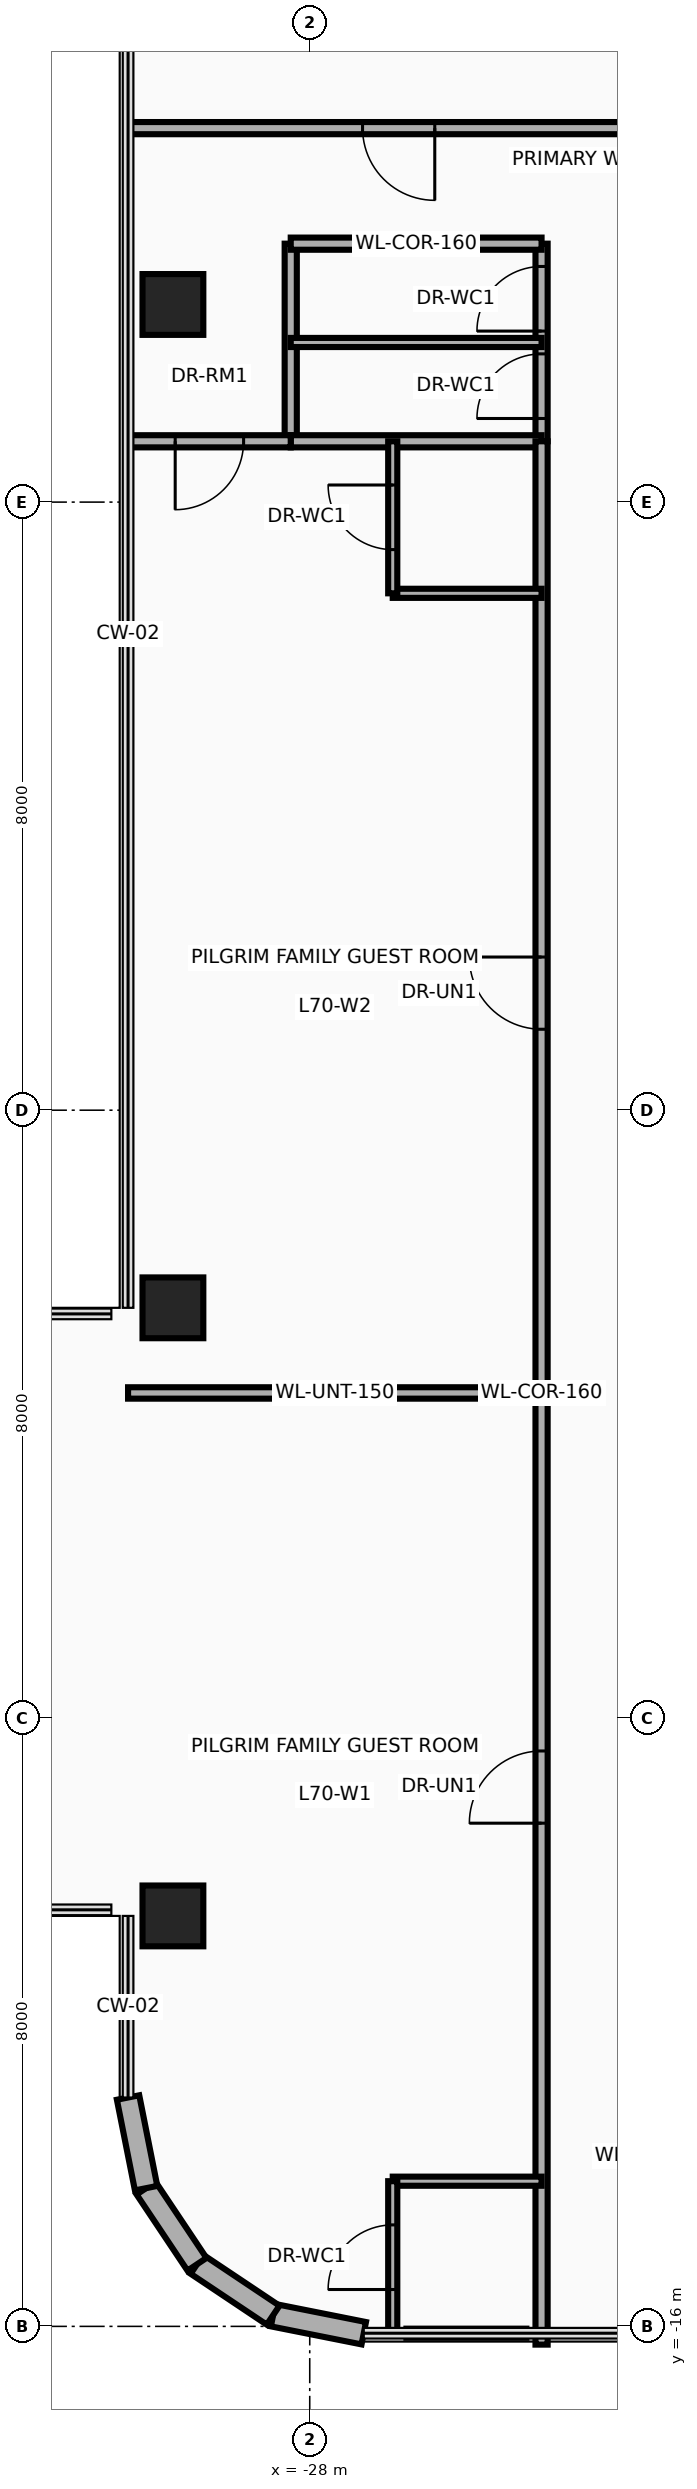
"""IFC4 building model, lengths in metres.
Left out: names, types, materials, properties, quantities, classifications, styles, units other than length and angle.
Written with IfcOpenShell. Run it as: python <this file> out.ifc"""

import sys

from ifc_helpers import new_model, si_unit, direction, frame, frame_2d, origin, origin_2d, place, context, subcontext, project, spatial, rectangle, extrude, source, transform, mapped, element, fill, save


model = new_model("IFC4")
c1 = context("Model", 3, precision=1e-05, world=origin(), true_north=direction((0.0, 1.0)))
c2 = subcontext(c1, "Body", "Model", "MODEL_VIEW")
j1 = project(units=[si_unit("LENGTHUNIT", "METRE"), si_unit("PLANEANGLEUNIT", "RADIAN")], contexts=[c1])
p1 = place(None, origin())
s1 = spatial("IfcSite", under=j1, at=p1, CompositionType="ELEMENT")
p2 = place(p1, origin())
s2 = spatial("IfcBuilding", under=s1, at=p2, CompositionType="ELEMENT")
p3 = place(p2, frame((0.0, 0.0, 269.5)))
s3 = spatial("IfcBuildingStorey", under=s2, at=p3, CompositionType="ELEMENT", Elevation=269.5)
m1 = source(origin(), c2, "Body", "SweptSolid", [
    extrude(rectangle(XDim=0.8, YDim=0.8, at=origin_2d()), origin(), (0.0, 0.0, 1.0), 3.5),
])
for number, where, z_axis, x_axis in (
    (1, (-29.8, -10.6, 0.0), (0.0, 0.0, 1.0), (1.0, 0.0, 0.0)),
    (2, (-29.8, -2.6, 0.0), (0.0, 0.0, 1.0), (1.0, 0.0, 0.0)),
    (3, (-29.8, 10.6, 0.0), (0.0, 0.0, 1.0), (1.0, 0.0, 0.0)),
):
    element("IfcColumn", number, at=place(p3, frame(where, z_axis=z_axis, x_axis=x_axis)), inside=s3, PredefinedType="COLUMN", context=c2, shape_type="MappedRepresentation", body=[
        mapped(m1, transform((0.0, 0.0, 0.0), x_axis=(1.0, 0.0, 0.0), y_axis=(0.0, 1.0, 0.0), z_axis=(0.0, 0.0, 1.0), scale=1.0)),
    ])
p4 = place(p3, frame((-27.289, -16.09, 0.0), z_axis=(0.0, 0.0, 1.0), x_axis=(-0.980765602568, 0.195189223115, 0.0)))
e4 = element("IfcWall", 4, at=p4, inside=s3, PredefinedType="SOLIDWALL", context=c2, shape_type="SweptSolid", body=[
    extrude(rectangle(XDim=1.216, YDim=0.3, at=frame_2d((0.608, 0.0))), origin(), (0.0, 0.0, 1.0), 3.26),
])
for number, where, z_axis, x_axis in (
    (5, (-28.482, -15.853, 0.0), (0.0, 0.0, 1.0), (-0.831, 0.556, 0.0)),
    (6, (-29.483, -15.183, 0.0), (0.0, 0.0, 1.0), (-0.556, 0.831, 0.0)),
):
    element("IfcWall", number, at=place(p3, frame(where, z_axis=z_axis, x_axis=x_axis)), inside=s3, PredefinedType="SOLIDWALL", context=c2, shape_type="SweptSolid", body=[
        extrude(rectangle(XDim=1.205, YDim=0.3, at=frame_2d((0.603, 0.0))), origin(), (0.0, 0.0, 1.0), 3.26),
    ])
p5 = place(p3, frame((-30.153, -14.182, 0.0), z_axis=(0.0, 0.0, 1.0), x_axis=(-0.194996050505, 0.980804027463, 0.0)))
e7 = element("IfcWall", 7, at=p5, inside=s3, PredefinedType="SOLIDWALL", context=c2, shape_type="SweptSolid", body=[
    extrude(rectangle(XDim=1.216, YDim=0.3, at=frame_2d((0.608, 0.0))), origin(), (0.0, 0.0, 1.0), 3.26),
])
p6 = place(p3, frame((-28.25, 8.8, 0.0), z_axis=(0.0, 0.0, 1.0), x_axis=(0.0, 1.0, 0.0)))
e8 = element("IfcWall", 8, at=p6, inside=s3, PredefinedType="PARTITIONING", context=c2, shape_type="SweptSolid", body=[
    extrude(rectangle(XDim=2.6, YDim=0.16, at=frame_2d((1.3, 0.0))), origin(), (0.0, 0.0, 1.0), 2.623),
])
p7 = place(p3, frame((-24.95, 8.8, 0.0), z_axis=(0.0, 0.0, 1.0), x_axis=(0.0, 1.0, 0.0)))
e9 = element("IfcWall", 9, at=p7, inside=s3, PredefinedType="PARTITIONING", context=c2, shape_type="SweptSolid", body=[
    extrude(rectangle(XDim=2.6, YDim=0.16, at=frame_2d((1.3, 0.0))), origin(), (0.0, 0.0, 1.0), 2.623),
])
p8 = place(p7, frame((0.3, 0.0, 0.0)))
e10 = element("IfcOpeningElement", 10, at=p8, cuts=e9, PredefinedType="OPENING", context=c2, shape_type="SweptSolid", body=[
    extrude(rectangle(XDim=0.85, YDim=2.1, at=frame_2d((0.425, 1.05))), frame((0.0, 0.095, 0.0), z_axis=(0.0, -1.0, 0.0), x_axis=(1.0, 0.0, 0.0)), (0.0, 0.0, 1.0), 0.19),
])
p9 = place(p7, frame((1.45, 0.0, 0.0)))
e11 = element("IfcOpeningElement", 11, at=p9, cuts=e9, PredefinedType="OPENING", context=c2, shape_type="SweptSolid", body=[
    extrude(rectangle(XDim=0.85, YDim=2.1, at=frame_2d((0.425, 1.05))), frame((0.0, 0.095, 0.0), z_axis=(0.0, -1.0, 0.0), x_axis=(1.0, 0.0, 0.0)), (0.0, 0.0, 1.0), 0.19),
])
for number, where, z_axis, x_axis in (
    (12, (-28.25, 8.8, 0.0), (0.0, 0.0, 1.0), (1.0, 0.0, 0.0)),
    (13, (-28.25, 11.4, 0.0), (0.0, 0.0, 1.0), (1.0, 0.0, 0.0)),
):
    element("IfcWall", number, at=place(p3, frame(where, z_axis=z_axis, x_axis=x_axis)), inside=s3, PredefinedType="PARTITIONING", context=c2, shape_type="SweptSolid", body=[
        extrude(rectangle(XDim=3.3, YDim=0.16, at=frame_2d((1.65, 0.0))), origin(), (0.0, 0.0, 1.0), 3.26),
    ])
p10 = place(p3, frame((-28.25, 10.1, 0.0), z_axis=(0.0, 0.0, 1.0), x_axis=(1.0, 0.0, 0.0)))
e14 = element("IfcWall", 14, at=p10, inside=s3, PredefinedType="PARTITIONING", context=c2, shape_type="SweptSolid", body=[
    extrude(rectangle(XDim=3.3, YDim=0.12, at=frame_2d((1.65, 0.0))), origin(), (0.0, 0.0, 1.0), 3.26),
])
p11 = place(p3, frame((-24.95, -16.24, 0.0), z_axis=(0.0, 0.0, 1.0), x_axis=(0.0, 1.0, 0.0)))
e15 = element("IfcWall", 15, at=p11, inside=s3, PredefinedType="PARTITIONING", context=c2, shape_type="SweptSolid", body=[
    extrude(rectangle(XDim=25.04, YDim=0.16, at=frame_2d((12.52, 0.0))), origin(), (0.0, 0.0, 1.0), 2.623),
])
p12 = place(p11, frame((6.86, 0.0, 0.0)))
e16 = element("IfcOpeningElement", 16, at=p12, cuts=e15, PredefinedType="OPENING", context=c2, shape_type="SweptSolid", body=[
    extrude(rectangle(XDim=0.95, YDim=2.15, at=frame_2d((0.475, 1.075))), frame((0.0, 0.095, 0.0), z_axis=(0.0, -1.0, 0.0), x_axis=(1.0, 0.0, 0.0)), (0.0, 0.0, 1.0), 0.19),
])
p13 = place(p11, frame((17.305, 0.0, 0.0)))
e17 = element("IfcOpeningElement", 17, at=p13, cuts=e15, PredefinedType="OPENING", context=c2, shape_type="SweptSolid", body=[
    extrude(rectangle(XDim=0.95, YDim=2.15, at=frame_2d((0.475, 1.075))), frame((0.0, 0.095, 0.0), z_axis=(0.0, -1.0, 0.0), x_axis=(1.0, 0.0, 0.0)), (0.0, 0.0, 1.0), 0.19),
])
p14 = place(p3, frame((-30.39, 8.8, 0.0), z_axis=(0.0, 0.0, 1.0), x_axis=(1.0, 0.0, 0.0)))
e18 = element("IfcWall", 18, at=p14, inside=s3, PredefinedType="PARTITIONING", context=c2, shape_type="SweptSolid", body=[
    extrude(rectangle(XDim=2.14, YDim=0.16, at=frame_2d((1.07, 0.0))), origin(), (0.0, 0.0, 1.0), 2.706),
])
p15 = place(p14, frame((0.62, 0.0, 0.0)))
e19 = element("IfcOpeningElement", 19, at=p15, cuts=e18, PredefinedType="OPENING", context=c2, shape_type="SweptSolid", body=[
    extrude(rectangle(XDim=0.9, YDim=2.1, at=frame_2d((0.45, 1.05))), frame((0.0, 0.095, 0.0), z_axis=(0.0, -1.0, 0.0), x_axis=(1.0, 0.0, 0.0)), (0.0, 0.0, 1.0), 0.19),
])
p16 = place(p3, frame((-30.39, -3.72, 0.0), z_axis=(0.0, 0.0, 1.0), x_axis=(1.0, 0.0, 0.0)))
e20 = element("IfcWall", 20, at=p16, inside=s3, PredefinedType="PARTITIONING", context=c2, shape_type="SweptSolid", body=[
    extrude(rectangle(XDim=5.44, YDim=0.15, at=frame_2d((2.72, 0.0))), origin(), (0.0, 0.0, 1.0), 2.706),
])
p17 = place(p3, frame((-26.908, -14.09, 0.0), z_axis=(0.0, 0.0, 1.0), x_axis=(1.0, 0.0, 0.0)))
e21 = element("IfcWall", 21, at=p17, inside=s3, PredefinedType="PARTITIONING", context=c2, shape_type="SweptSolid", body=[
    extrude(rectangle(XDim=1.958, YDim=0.12, at=frame_2d((0.979, 0.0))), origin(), (0.0, 0.0, 1.0), 3.26),
])
p18 = place(p3, frame((-26.908, -16.09, 0.0), z_axis=(0.0, 0.0, 1.0), x_axis=(0.0, 1.0, 0.0)))
e22 = element("IfcWall", 22, at=p18, inside=s3, PredefinedType="PARTITIONING", context=c2, shape_type="SweptSolid", body=[
    extrude(rectangle(XDim=2.0, YDim=0.12, at=frame_2d((1.0, 0.0))), origin(), (0.0, 0.0, 1.0), 3.26),
])
p19 = place(p18, frame((0.575, 0.0, 0.0)))
e23 = element("IfcOpeningElement", 23, at=p19, cuts=e22, PredefinedType="OPENING", context=c2, shape_type="SweptSolid", body=[
    extrude(rectangle(XDim=0.85, YDim=2.1, at=frame_2d((0.425, 1.05))), frame((0.0, 0.075, 0.0), z_axis=(0.0, -1.0, 0.0), x_axis=(1.0, 0.0, 0.0)), (0.0, 0.0, 1.0), 0.15),
])
p20 = place(p3, frame((-26.728, -16.09, 0.0), z_axis=(0.0, 0.0, 1.0), x_axis=(1.0, 0.0, 0.0)))
e24 = element("IfcWall", 24, at=p20, inside=s3, PredefinedType="PARTITIONING", context=c2, shape_type="SweptSolid", body=[
    extrude(rectangle(XDim=1.578, YDim=0.12, at=frame_2d((0.789, 0.0))), origin(), (0.0, 0.0, 1.0), 3.26),
])
p21 = place(p3, frame((-26.908, 6.8, 0.0), z_axis=(0.0, 0.0, 1.0), x_axis=(1.0, 0.0, 0.0)))
e25 = element("IfcWall", 25, at=p21, inside=s3, PredefinedType="PARTITIONING", context=c2, shape_type="SweptSolid", body=[
    extrude(rectangle(XDim=1.958, YDim=0.12, at=frame_2d((0.979, 0.0))), origin(), (0.0, 0.0, 1.0), 2.839),
])
p22 = place(p3, frame((-26.908, 6.8, 0.0), z_axis=(0.0, 0.0, 1.0), x_axis=(0.0, 1.0, 0.0)))
e26 = element("IfcWall", 26, at=p22, inside=s3, PredefinedType="PARTITIONING", context=c2, shape_type="SweptSolid", body=[
    extrude(rectangle(XDim=2.0, YDim=0.12, at=frame_2d((1.0, 0.0))), origin(), (0.0, 0.0, 1.0), 2.839),
])
p23 = place(p22, frame((0.575, 0.0, 0.0)))
e27 = element("IfcOpeningElement", 27, at=p23, cuts=e26, PredefinedType="OPENING", context=c2, shape_type="SweptSolid", body=[
    extrude(rectangle(XDim=0.85, YDim=2.1, at=frame_2d((0.425, 1.05))), frame((0.0, 0.075, 0.0), z_axis=(0.0, -1.0, 0.0), x_axis=(1.0, 0.0, 0.0)), (0.0, 0.0, 1.0), 0.15),
])
p24 = place(p3, frame((-30.39, 12.92, 0.0), z_axis=(0.0, 0.0, 1.0), x_axis=(1.0, 0.0, 0.0)))
e28 = element("IfcWall", 28, at=p24, inside=s3, PredefinedType="PARTITIONING", context=c2, shape_type="SweptSolid", body=[
    extrude(rectangle(XDim=29.48, YDim=0.16, at=frame_2d((14.74, 0.0))), origin(), (0.0, 0.0, 1.0), 2.634),
])
p25 = place(p24, frame((3.085, 0.0, 0.0)))
e29 = element("IfcOpeningElement", 29, at=p25, cuts=e28, PredefinedType="OPENING", context=c2, shape_type="SweptSolid", body=[
    extrude(rectangle(XDim=0.95, YDim=2.15, at=frame_2d((0.475, 1.075))), frame((0.0, 0.095, 0.0), z_axis=(0.0, -1.0, 0.0), x_axis=(1.0, 0.0, 0.0)), (0.0, 0.0, 1.0), 0.19),
])
p26 = place(p24, frame((9.105, 0.0, 0.0)))
e30 = element("IfcOpeningElement", 30, at=p26, cuts=e28, PredefinedType="OPENING", context=c2, shape_type="SweptSolid", body=[
    extrude(rectangle(XDim=0.95, YDim=2.15, at=frame_2d((0.475, 1.075))), frame((0.0, 0.095, 0.0), z_axis=(0.0, -1.0, 0.0), x_axis=(1.0, 0.0, 0.0)), (0.0, 0.0, 1.0), 0.19),
])
p27 = place(p24, frame((17.27, 0.0, 0.0)))
e31 = element("IfcOpeningElement", 31, at=p27, cuts=e28, PredefinedType="OPENING", context=c2, shape_type="SweptSolid", body=[
    extrude(rectangle(XDim=0.95, YDim=2.15, at=frame_2d((0.475, 1.075))), frame((0.0, 0.095, 0.0), z_axis=(0.0, -1.0, 0.0), x_axis=(1.0, 0.0, 0.0)), (0.0, 0.0, 1.0), 0.19),
])
p28 = place(p8, origin())
e32 = element("IfcDoor", 32, at=p28, inside=s3, OperationType="SINGLE_SWING_LEFT", PredefinedType="DOOR", context=c2, shape_type="SweptSolid", body=[
    extrude(rectangle(XDim=0.85, YDim=2.1, at=frame_2d((0.425, 1.05))), frame((0.0, 0.025, 0.0), z_axis=(0.0, -1.0, 0.0), x_axis=(1.0, 0.0, 0.0)), (0.0, 0.0, 1.0), 0.05),
])
fill(e10, e32)
p29 = place(p9, origin())
e33 = element("IfcDoor", 33, at=p29, inside=s3, OperationType="SINGLE_SWING_RIGHT", PredefinedType="DOOR", context=c2, shape_type="SweptSolid", body=[
    extrude(rectangle(XDim=0.85, YDim=2.1, at=frame_2d((0.425, 1.05))), frame((0.0, 0.025, 0.0), z_axis=(0.0, -1.0, 0.0), x_axis=(1.0, 0.0, 0.0)), (0.0, 0.0, 1.0), 0.05),
])
fill(e11, e33)
p30 = place(p15, frame((0.9, 0.0, 0.0), z_axis=(0.0, 0.0, 1.0), x_axis=(-1.0, 0.0, 0.0)))
e34 = element("IfcDoor", 34, at=p30, inside=s3, OperationType="SINGLE_SWING_LEFT", PredefinedType="DOOR", context=c2, shape_type="SweptSolid", body=[
    extrude(rectangle(XDim=0.9, YDim=2.1, at=frame_2d((0.45, 1.05))), frame((0.0, 0.025, 0.0), z_axis=(0.0, -1.0, 0.0), x_axis=(1.0, 0.0, 0.0)), (0.0, 0.0, 1.0), 0.05),
])
fill(e19, e34)
p31 = place(p12, origin())
e35 = element("IfcDoor", 35, at=p31, inside=s3, OperationType="SINGLE_SWING_RIGHT", PredefinedType="DOOR", context=c2, shape_type="SweptSolid", body=[
    extrude(rectangle(XDim=0.95, YDim=2.15, at=frame_2d((0.475, 1.075))), frame((0.0, 0.025, 0.0), z_axis=(0.0, -1.0, 0.0), x_axis=(1.0, 0.0, 0.0)), (0.0, 0.0, 1.0), 0.05),
])
fill(e16, e35)
p32 = place(p19, origin())
e36 = element("IfcDoor", 36, at=p32, inside=s3, OperationType="SINGLE_SWING_LEFT", PredefinedType="DOOR", context=c2, shape_type="SweptSolid", body=[
    extrude(rectangle(XDim=0.85, YDim=2.1, at=frame_2d((0.425, 1.05))), frame((0.0, 0.025, 0.0), z_axis=(0.0, -1.0, 0.0), x_axis=(1.0, 0.0, 0.0)), (0.0, 0.0, 1.0), 0.05),
])
fill(e23, e36)
p33 = place(p13, origin())
e37 = element("IfcDoor", 37, at=p33, inside=s3, OperationType="SINGLE_SWING_RIGHT", PredefinedType="DOOR", context=c2, shape_type="SweptSolid", body=[
    extrude(rectangle(XDim=0.95, YDim=2.15, at=frame_2d((0.475, 1.075))), frame((0.0, 0.025, 0.0), z_axis=(0.0, -1.0, 0.0), x_axis=(1.0, 0.0, 0.0)), (0.0, 0.0, 1.0), 0.05),
])
fill(e17, e37)
p34 = place(p23, origin())
e38 = element("IfcDoor", 38, at=p34, inside=s3, OperationType="SINGLE_SWING_LEFT", PredefinedType="DOOR", context=c2, shape_type="SweptSolid", body=[
    extrude(rectangle(XDim=0.85, YDim=2.1, at=frame_2d((0.425, 1.05))), frame((0.0, 0.025, 0.0), z_axis=(0.0, -1.0, 0.0), x_axis=(1.0, 0.0, 0.0)), (0.0, 0.0, 1.0), 0.05),
])
fill(e27, e38)
p35 = place(p25, frame((0.95, 0.0, 0.0), z_axis=(0.0, 0.0, 1.0), x_axis=(-1.0, 0.0, 0.0)))
e39 = element("IfcDoor", 39, at=p35, inside=s3, OperationType="SINGLE_SWING_LEFT", PredefinedType="DOOR", context=c2, shape_type="SweptSolid", body=[
    extrude(rectangle(XDim=0.95, YDim=2.15, at=frame_2d((0.475, 1.075))), frame((0.0, 0.025, 0.0), z_axis=(0.0, -1.0, 0.0), x_axis=(1.0, 0.0, 0.0)), (0.0, 0.0, 1.0), 0.05),
])
fill(e29, e39)
save(model, sys.argv[1])
